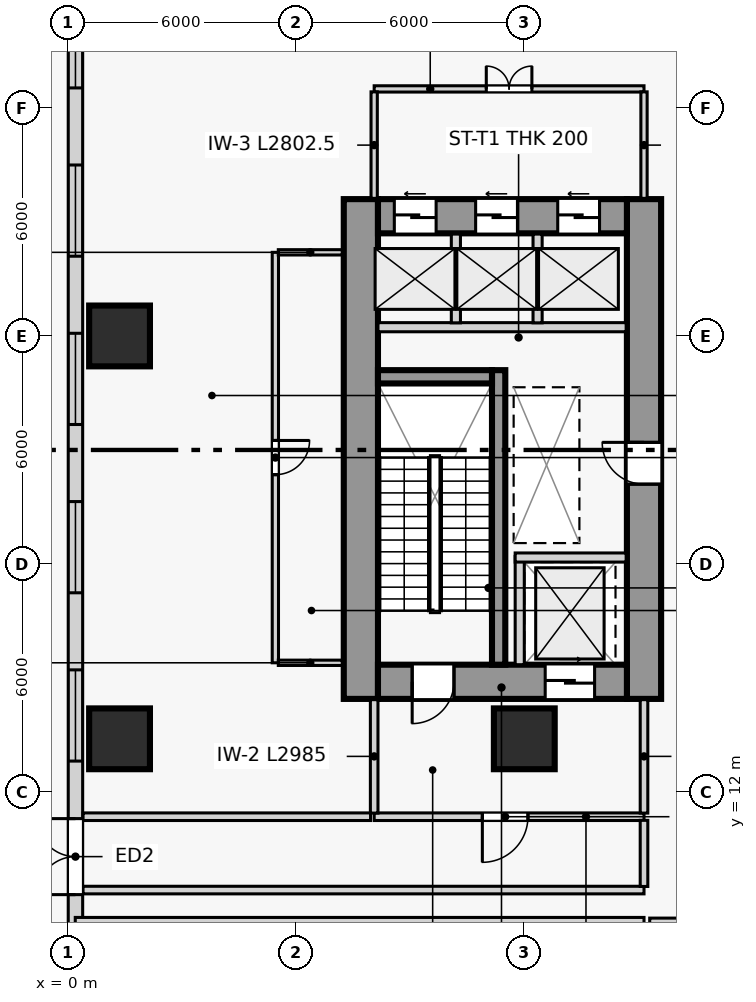
"""IFC4 building model, lengths in metres.
Left out: names, types, materials, properties, quantities, classifications, styles, units other than length and angle.
Written with IfcOpenShell. Run it as: python <this file> out.ifc"""

import sys

from ifc_helpers import new_model, si_unit, direction, frame, frame_2d, origin, origin_2d, place, context, subcontext, project, spatial, rectangle, extrude, source, transform, mapped, element, fill, save


model = new_model("IFC4")
c1 = context("Model", 3, precision=1e-05, world=origin(), true_north=direction((0.0, 1.0)))
c2 = subcontext(c1, "Body", "Model", "MODEL_VIEW")
j1 = project(units=[si_unit("LENGTHUNIT", "METRE"), si_unit("PLANEANGLEUNIT", "RADIAN")], contexts=[c1])
p1 = place(None, origin())
s1 = spatial("IfcSite", under=j1, at=p1, CompositionType="ELEMENT")
p2 = place(p1, origin())
s2 = spatial("IfcBuilding", under=s1, at=p2, CompositionType="ELEMENT")
p3 = place(p2, origin())
s3 = spatial("IfcBuildingStorey", under=s2, at=p3, CompositionType="ELEMENT", Elevation=0.0)
p4 = place(p3, frame((7.7, 14.45, 0.0), z_axis=(0.0, 0.0, 1.0), x_axis=(0.0, 1.0, 0.0)))
e1 = element("IfcWall", 1, at=p4, inside=s3, PredefinedType="SHEAR", context=c2, shape_type="SweptSolid", body=[
    extrude(rectangle(XDim=13.15, YDim=0.9, at=frame_2d((6.575, 0.0))), origin(), (0.0, 0.0, 1.0), 4.5),
])
p5 = place(p3, frame((15.15, 14.45, 0.0), z_axis=(0.0, 0.0, 1.0), x_axis=(0.0, 1.0, 0.0)))
e2 = element("IfcWall", 2, at=p5, inside=s3, PredefinedType="SHEAR", context=c2, shape_type="SweptSolid", body=[
    extrude(rectangle(XDim=13.15, YDim=0.9, at=frame_2d((6.575, 0.0))), origin(), (0.0, 0.0, 1.0), 4.5),
])
p6 = place(p5, frame((5.65, 0.0, 0.0)))
e3 = element("IfcOpeningElement", 3, at=p6, cuts=e2, PredefinedType="OPENING", context=c2, shape_type="SweptSolid", body=[
    extrude(rectangle(XDim=1.1, YDim=2.2, at=frame_2d((0.55, 1.1))), frame((0.0, 0.46, 0.0), z_axis=(0.0, -1.0, 0.0), x_axis=(1.0, 0.0, 0.0)), (0.0, 0.0, 1.0), 0.92),
])
p7 = place(p3, frame((8.15, 14.9, 0.0), z_axis=(0.0, 0.0, 1.0), x_axis=(1.0, 0.0, 0.0)))
e4 = element("IfcWall", 4, at=p7, inside=s3, PredefinedType="SHEAR", context=c2, shape_type="SweptSolid", body=[
    extrude(rectangle(XDim=6.55, YDim=0.9, at=frame_2d((3.275, 0.0))), origin(), (0.0, 0.0, 1.0), 4.5),
])
p8 = place(p7, frame((0.9, 0.0, 0.0)))
e5 = element("IfcOpeningElement", 5, at=p8, cuts=e4, PredefinedType="OPENING", context=c2, shape_type="SweptSolid", body=[
    extrude(rectangle(XDim=1.1, YDim=2.2, at=frame_2d((0.55, 1.1))), frame((0.0, 0.46, 0.0), z_axis=(0.0, -1.0, 0.0), x_axis=(1.0, 0.0, 0.0)), (0.0, 0.0, 1.0), 0.92),
])
p9 = place(p7, frame((4.4, 0.0, 0.0)))
e6 = element("IfcOpeningElement", 6, at=p9, cuts=e4, PredefinedType="OPENING", context=c2, shape_type="SweptSolid", body=[
    extrude(rectangle(XDim=1.3, YDim=2.2, at=frame_2d((0.65, 1.1))), frame((0.0, 0.46, 0.0), z_axis=(0.0, -1.0, 0.0), x_axis=(1.0, 0.0, 0.0)), (0.0, 0.0, 1.0), 0.92),
])
p10 = place(p3, frame((8.15, 27.15, 0.0), z_axis=(0.0, 0.0, 1.0), x_axis=(1.0, 0.0, 0.0)))
e7 = element("IfcWall", 7, at=p10, inside=s3, PredefinedType="SHEAR", context=c2, shape_type="SweptSolid", body=[
    extrude(rectangle(XDim=6.55, YDim=0.9, at=frame_2d((3.275, 0.0))), origin(), (0.0, 0.0, 1.0), 4.5),
])
p11 = place(p10, frame((0.43, 0.0, 0.0)))
e8 = element("IfcOpeningElement", 8, at=p11, cuts=e7, PredefinedType="OPENING", context=c2, shape_type="SweptSolid", body=[
    extrude(rectangle(XDim=1.1, YDim=2.2, at=frame_2d((0.55, 1.1))), frame((0.0, 0.46, 0.0), z_axis=(0.0, -1.0, 0.0), x_axis=(1.0, 0.0, 0.0)), (0.0, 0.0, 1.0), 0.92),
])
p12 = place(p10, frame((2.57, 0.0, 0.0)))
e9 = element("IfcOpeningElement", 9, at=p12, cuts=e7, PredefinedType="OPENING", context=c2, shape_type="SweptSolid", body=[
    extrude(rectangle(XDim=1.1, YDim=2.2, at=frame_2d((0.55, 1.1))), frame((0.0, 0.46, 0.0), z_axis=(0.0, -1.0, 0.0), x_axis=(1.0, 0.0, 0.0)), (0.0, 0.0, 1.0), 0.92),
])
p13 = place(p10, frame((4.73, 0.0, 0.0)))
e10 = element("IfcOpeningElement", 10, at=p13, cuts=e7, PredefinedType="OPENING", context=c2, shape_type="SweptSolid", body=[
    extrude(rectangle(XDim=1.1, YDim=2.2, at=frame_2d((0.55, 1.1))), frame((0.0, 0.46, 0.0), z_axis=(0.0, -1.0, 0.0), x_axis=(1.0, 0.0, 0.0)), (0.0, 0.0, 1.0), 0.92),
])
p14 = place(p3, frame((11.325, 15.35, 0.0), z_axis=(0.0, 0.0, 1.0), x_axis=(0.0, 1.0, 0.0)))
e11 = element("IfcWall", 11, at=p14, inside=s3, PredefinedType="SHEAR", context=c2, shape_type="SweptSolid", body=[
    extrude(rectangle(XDim=7.75, YDim=0.35, at=frame_2d((3.875, 0.0))), origin(), (0.0, 0.0, 1.0), 4.5),
])
p15 = place(p3, frame((8.15, 22.925, 0.0), z_axis=(0.0, 0.0, 1.0), x_axis=(1.0, 0.0, 0.0)))
e12 = element("IfcWall", 12, at=p15, inside=s3, PredefinedType="SHEAR", context=c2, shape_type="SweptSolid", body=[
    extrude(rectangle(XDim=3.0, YDim=0.35, at=frame_2d((1.5, 0.0))), origin(), (0.0, 0.0, 1.0), 4.5),
])
m1 = source(origin(), c2, "Body", "SweptSolid", [
    extrude(rectangle(XDim=1.6, YDim=1.6, at=origin_2d()), origin(), (0.0, 0.0, 1.0), 4.5),
])
for number, where, z_axis, x_axis in (
    (13, (1.35, 13.4, 0.0), (0.0, 0.0, 1.0), (1.0, 0.0, 0.0)),
    (14, (1.35, 24.0, 0.0), (0.0, 0.0, 1.0), (1.0, 0.0, 0.0)),
    (15, (12.0, 13.4, 0.0), (0.0, 0.0, 1.0), (1.0, 0.0, 0.0)),
):
    element("IfcColumn", number, at=place(p3, frame(where, z_axis=z_axis, x_axis=x_axis)), inside=s3, PredefinedType="COLUMN", context=c2, shape_type="MappedRepresentation", body=[
        mapped(m1, transform((0.0, 0.0, 0.0), scale=1.0)),
    ])
p16 = place(p3, frame((0.19, 47.81, 0.0), z_axis=(0.0, 0.0, 1.0), x_axis=(0.0, -1.0, 0.0)))
e16 = element("IfcWall", 16, at=p16, inside=s3, PredefinedType="SOLIDWALL", context=c2, shape_type="SweptSolid", body=[
    extrude(rectangle(XDim=53.62, YDim=0.38, at=frame_2d((26.81, 0.0))), origin(), (0.0, 0.0, 1.0), 4.16),
])
p17 = place(p16, frame((1.325, 0.0, 0.8)))
e17 = element("IfcOpeningElement", 17, at=p17, cuts=e16, PredefinedType="OPENING", context=c2, shape_type="SweptSolid", body=[
    extrude(rectangle(XDim=2.4, YDim=2.1, at=frame_2d((1.2, 1.05))), frame((0.0, 0.2, 0.0), z_axis=(0.0, -1.0, 0.0), x_axis=(1.0, 0.0, 0.0)), (0.0, 0.0, 1.0), 0.4),
])
p18 = place(p16, frame((5.655, 0.0, 0.8)))
e18 = element("IfcOpeningElement", 18, at=p18, cuts=e16, PredefinedType="OPENING", context=c2, shape_type="SweptSolid", body=[
    extrude(rectangle(XDim=2.4, YDim=2.1, at=frame_2d((1.2, 1.05))), frame((0.0, 0.2, 0.0), z_axis=(0.0, -1.0, 0.0), x_axis=(1.0, 0.0, 0.0)), (0.0, 0.0, 1.0), 0.4),
])
p19 = place(p16, frame((9.985, 0.0, 0.8)))
e19 = element("IfcOpeningElement", 19, at=p19, cuts=e16, PredefinedType="OPENING", context=c2, shape_type="SweptSolid", body=[
    extrude(rectangle(XDim=2.4, YDim=2.1, at=frame_2d((1.2, 1.05))), frame((0.0, 0.2, 0.0), z_axis=(0.0, -1.0, 0.0), x_axis=(1.0, 0.0, 0.0)), (0.0, 0.0, 1.0), 0.4),
])
p20 = place(p16, frame((14.884, 0.0, 0.8)))
e20 = element("IfcOpeningElement", 20, at=p20, cuts=e16, PredefinedType="OPENING", context=c2, shape_type="SweptSolid", body=[
    extrude(rectangle(XDim=2.4, YDim=2.1, at=frame_2d((1.2, 1.05))), frame((0.0, 0.2, 0.0), z_axis=(0.0, -1.0, 0.0), x_axis=(1.0, 0.0, 0.0)), (0.0, 0.0, 1.0), 0.4),
])
p21 = place(p16, frame((19.312, 0.0, 0.8)))
e21 = element("IfcOpeningElement", 21, at=p21, cuts=e16, PredefinedType="OPENING", context=c2, shape_type="SweptSolid", body=[
    extrude(rectangle(XDim=2.4, YDim=2.1, at=frame_2d((1.2, 1.05))), frame((0.0, 0.2, 0.0), z_axis=(0.0, -1.0, 0.0), x_axis=(1.0, 0.0, 0.0)), (0.0, 0.0, 1.0), 0.4),
])
p22 = place(p16, frame((23.74, 0.0, 0.8)))
e22 = element("IfcOpeningElement", 22, at=p22, cuts=e16, PredefinedType="OPENING", context=c2, shape_type="SweptSolid", body=[
    extrude(rectangle(XDim=2.4, YDim=2.1, at=frame_2d((1.2, 1.05))), frame((0.0, 0.2, 0.0), z_axis=(0.0, -1.0, 0.0), x_axis=(1.0, 0.0, 0.0)), (0.0, 0.0, 1.0), 0.4),
])
p23 = place(p16, frame((28.168, 0.0, 0.8)))
e23 = element("IfcOpeningElement", 23, at=p23, cuts=e16, PredefinedType="OPENING", context=c2, shape_type="SweptSolid", body=[
    extrude(rectangle(XDim=2.4, YDim=2.1, at=frame_2d((1.2, 1.05))), frame((0.0, 0.2, 0.0), z_axis=(0.0, -1.0, 0.0), x_axis=(1.0, 0.0, 0.0)), (0.0, 0.0, 1.0), 0.4),
])
p24 = place(p16, frame((32.596, 0.0, 0.8)))
e24 = element("IfcOpeningElement", 24, at=p24, cuts=e16, PredefinedType="OPENING", context=c2, shape_type="SweptSolid", body=[
    extrude(rectangle(XDim=2.4, YDim=2.1, at=frame_2d((1.2, 1.05))), frame((0.0, 0.2, 0.0), z_axis=(0.0, -1.0, 0.0), x_axis=(1.0, 0.0, 0.0)), (0.0, 0.0, 1.0), 0.4),
])
p25 = place(p16, frame((40.568, 0.0, 0.8)))
e25 = element("IfcOpeningElement", 25, at=p25, cuts=e16, PredefinedType="OPENING", context=c2, shape_type="SweptSolid", body=[
    extrude(rectangle(XDim=2.4, YDim=2.1, at=frame_2d((1.2, 1.05))), frame((0.0, 0.2, 0.0), z_axis=(0.0, -1.0, 0.0), x_axis=(1.0, 0.0, 0.0)), (0.0, 0.0, 1.0), 0.4),
])
p26 = place(p16, frame((45.165, 0.0, 0.8)))
e26 = element("IfcOpeningElement", 26, at=p26, cuts=e16, PredefinedType="OPENING", context=c2, shape_type="SweptSolid", body=[
    extrude(rectangle(XDim=2.4, YDim=2.1, at=frame_2d((1.2, 1.05))), frame((0.0, 0.2, 0.0), z_axis=(0.0, -1.0, 0.0), x_axis=(1.0, 0.0, 0.0)), (0.0, 0.0, 1.0), 0.4),
])
p27 = place(p16, frame((49.762, 0.0, 0.8)))
e27 = element("IfcOpeningElement", 27, at=p27, cuts=e16, PredefinedType="OPENING", context=c2, shape_type="SweptSolid", body=[
    extrude(rectangle(XDim=2.4, YDim=2.1, at=frame_2d((1.2, 1.05))), frame((0.0, 0.2, 0.0), z_axis=(0.0, -1.0, 0.0), x_axis=(1.0, 0.0, 0.0)), (0.0, 0.0, 1.0), 0.4),
])
p28 = place(p16, frame((36.51, 0.0, 0.0)))
e28 = element("IfcOpeningElement", 28, at=p28, cuts=e16, PredefinedType="OPENING", context=c2, shape_type="SweptSolid", body=[
    extrude(rectangle(XDim=2.0, YDim=2.4, at=frame_2d((1.0, 1.2))), frame((0.0, 0.2, 0.0), z_axis=(0.0, -1.0, 0.0), x_axis=(1.0, 0.0, 0.0)), (0.0, 0.0, 1.0), 0.4),
])
p29 = place(p3, frame((11.88, 15.35, 0.0), z_axis=(0.0, 0.0, 1.0), x_axis=(0.0, 1.0, 0.0)))
e29 = element("IfcWall", 29, at=p29, inside=s3, PredefinedType="PARTITIONING", context=c2, shape_type="SweptSolid", body=[
    extrude(rectangle(XDim=2.85, YDim=0.24, at=frame_2d((1.425, 0.0))), origin(), (0.0, 0.0, 1.0), 4.16),
])
p30 = place(p3, frame((11.76, 18.17, 0.0), z_axis=(0.0, 0.0, 1.0), x_axis=(1.0, 0.0, 0.0)))
e30 = element("IfcWall", 30, at=p30, inside=s3, PredefinedType="PARTITIONING", context=c2, shape_type="SweptSolid", body=[
    extrude(rectangle(XDim=2.92, YDim=0.24, at=frame_2d((1.46, 0.0))), origin(), (0.0, 0.0, 1.0), 4.16),
])
p31 = place(p3, frame((8.05, 11.35, 0.0), z_axis=(0.0, 0.0, 1.0), x_axis=(1.0, 0.0, 0.0)))
e31 = element("IfcWall", 31, at=p31, inside=s3, PredefinedType="PARTITIONING", context=c2, shape_type="SweptSolid", body=[
    extrude(rectangle(XDim=7.1, YDim=0.2, at=frame_2d((3.55, 0.0))), origin(), (0.0, 0.0, 1.0), 4.16),
])
p32 = place(p31, frame((2.846, 0.0, 0.0)))
e32 = element("IfcOpeningElement", 32, at=p32, cuts=e31, PredefinedType="OPENING", context=c2, shape_type="SweptSolid", body=[
    extrude(rectangle(XDim=1.2, YDim=2.2, at=frame_2d((0.6, 1.1))), frame((0.0, 0.11, 0.0), z_axis=(0.0, -1.0, 0.0), x_axis=(1.0, 0.0, 0.0)), (0.0, 0.0, 1.0), 0.22),
])
for number, where, z_axis, x_axis in (
    (33, (8.05, 11.445, 0.0), (0.0, 0.0, 1.0), (0.0, 1.0, 0.0)),
    (34, (15.15, 11.445, 0.0), (0.0, 0.0, 1.0), (0.0, 1.0, 0.0)),
):
    element("IfcWall", number, at=place(p3, frame(where, z_axis=z_axis, x_axis=x_axis)), inside=s3, PredefinedType="PARTITIONING", context=c2, shape_type="SweptSolid", body=[
        extrude(rectangle(XDim=2.985, YDim=0.2, at=frame_2d((1.492, 0.0))), origin(), (0.0, 0.0, 1.0), 4.16),
    ])
p33 = place(p3, frame((8.15, 24.23, 0.0), z_axis=(0.0, 0.0, 1.0), x_axis=(1.0, 0.0, 0.0)))
e35 = element("IfcWall", 35, at=p33, inside=s3, PredefinedType="PARTITIONING", context=c2, shape_type="SweptSolid", body=[
    extrude(rectangle(XDim=6.53, YDim=0.24, at=frame_2d((3.265, 0.0))), origin(), (0.0, 0.0, 1.0), 4.16),
])
for number, where, z_axis, x_axis in (
    (36, (10.2, 24.345, 0.0), (0.0, 0.0, 1.0), (0.0, 1.0, 0.0)),
    (37, (12.35, 24.345, 0.0), (0.0, 0.0, 1.0), (0.0, 1.0, 0.0)),
):
    element("IfcWall", number, at=place(p3, frame(where, z_axis=z_axis, x_axis=x_axis)), inside=s3, PredefinedType="PARTITIONING", context=c2, shape_type="SweptSolid", body=[
        extrude(rectangle(XDim=2.335, YDim=0.24, at=frame_2d((1.167, 0.0))), origin(), (0.0, 0.0, 1.0), 4.16),
    ])
p34 = place(p3, frame((8.05, 30.5, 0.0), z_axis=(0.0, 0.0, 1.0), x_axis=(1.0, 0.0, 0.0)))
e38 = element("IfcWall", 38, at=p34, inside=s3, PredefinedType="PARTITIONING", context=c2, shape_type="SweptSolid", body=[
    extrude(rectangle(XDim=7.1, YDim=0.165, at=frame_2d((3.55, 0.0))), origin(), (0.0, 0.0, 1.0), 4.16),
])
p35 = place(p34, frame((2.95, 0.0, 0.0)))
e39 = element("IfcOpeningElement", 39, at=p35, cuts=e38, PredefinedType="OPENING", context=c2, shape_type="SweptSolid", body=[
    extrude(rectangle(XDim=1.2, YDim=2.2, at=frame_2d((0.6, 1.1))), frame((0.0, 0.093, 0.0), z_axis=(0.0, -1.0, 0.0), x_axis=(1.0, 0.0, 0.0)), (0.0, 0.0, 1.0), 0.185),
])
for number, where, z_axis, x_axis in (
    (40, (8.05, 27.62, 0.0), (0.0, 0.0, 1.0), (0.0, 1.0, 0.0)),
    (41, (15.15, 27.62, 0.0), (0.0, 0.0, 1.0), (0.0, 1.0, 0.0)),
):
    element("IfcWall", number, at=place(p3, frame(where, z_axis=z_axis, x_axis=x_axis)), inside=s3, PredefinedType="PARTITIONING", context=c2, shape_type="SweptSolid", body=[
        extrude(rectangle(XDim=2.802, YDim=0.165, at=frame_2d((1.401, 0.0))), origin(), (0.0, 0.0, 1.0), 4.16),
    ])
p36 = place(p3, frame((5.45, 15.4, 0.0), z_axis=(0.0, 0.0, 1.0), x_axis=(0.0, 1.0, 0.0)))
e42 = element("IfcWall", 42, at=p36, inside=s3, PredefinedType="PARTITIONING", context=c2, shape_type="SweptSolid", body=[
    extrude(rectangle(XDim=10.8, YDim=0.165, at=frame_2d((5.4, 0.0))), origin(), (0.0, 0.0, 1.0), 4.16),
])
p37 = place(p36, frame((4.95, 0.0, 0.0)))
e43 = element("IfcOpeningElement", 43, at=p37, cuts=e42, PredefinedType="OPENING", context=c2, shape_type="SweptSolid", body=[
    extrude(rectangle(XDim=0.9, YDim=2.1, at=frame_2d((0.45, 1.05))), frame((0.0, 0.093, 0.0), z_axis=(0.0, -1.0, 0.0), x_axis=(1.0, 0.0, 0.0)), (0.0, 0.0, 1.0), 0.185),
])
for number, where, z_axis, x_axis in (
    (44, (5.528, 15.4, 0.0), (0.0, 0.0, 1.0), (1.0, 0.0, 0.0)),
    (45, (5.528, 26.2, 0.0), (0.0, 0.0, 1.0), (1.0, 0.0, 0.0)),
):
    element("IfcWall", number, at=place(p3, frame(where, z_axis=z_axis, x_axis=x_axis)), inside=s3, PredefinedType="PARTITIONING", context=c2, shape_type="SweptSolid", body=[
        extrude(rectangle(XDim=1.682, YDim=0.14, at=frame_2d((0.841, 0.0))), origin(), (0.0, 0.0, 1.0), 4.16),
    ])
p38 = place(p3, frame((15.3, 8.6, 0.0), z_axis=(0.0, 0.0, 1.0), x_axis=(1.0, 0.0, 0.0)))
e46 = element("IfcWall", 46, at=p38, inside=s3, PredefinedType="PARTITIONING", context=c2, shape_type="SweptSolid", body=[
    extrude(rectangle(XDim=10.15, YDim=0.165, at=frame_2d((5.075, 0.0))), origin(), (0.0, 0.0, 1.0), 4.16),
])
p39 = place(p38, frame((4.475, 0.0, 0.0)))
e47 = element("IfcOpeningElement", 47, at=p39, cuts=e46, PredefinedType="OPENING", context=c2, shape_type="SweptSolid", body=[
    extrude(rectangle(XDim=1.2, YDim=2.2, at=frame_2d((0.6, 1.1))), frame((0.0, 0.093, 0.0), z_axis=(0.0, -1.0, 0.0), x_axis=(1.0, 0.0, 0.0)), (0.0, 0.0, 1.0), 0.185),
])
p40 = place(p3, frame((0.39, 9.42, 0.0), z_axis=(0.0, 0.0, 1.0), x_axis=(1.0, 0.0, 0.0)))
e48 = element("IfcWall", 48, at=p40, inside=s3, PredefinedType="PARTITIONING", context=c2, shape_type="SweptSolid", body=[
    extrude(rectangle(XDim=14.76, YDim=0.2, at=frame_2d((7.38, 0.0))), origin(), (0.0, 0.0, 1.0), 4.16),
])
p41 = place(p3, frame((0.39, 11.35, 0.0), z_axis=(0.0, 0.0, 1.0), x_axis=(1.0, 0.0, 0.0)))
e49 = element("IfcWall", 49, at=p41, inside=s3, PredefinedType="PARTITIONING", context=c2, shape_type="SweptSolid", body=[
    extrude(rectangle(XDim=7.565, YDim=0.2, at=frame_2d((3.783, 0.0))), origin(), (0.0, 0.0, 1.0), 4.16),
])
p42 = place(p3, frame((15.15, 9.515, 0.0), z_axis=(0.0, 0.0, 1.0), x_axis=(0.0, 1.0, 0.0)))
e50 = element("IfcWall", 50, at=p42, inside=s3, PredefinedType="PARTITIONING", context=c2, shape_type="SweptSolid", body=[
    extrude(rectangle(XDim=1.74, YDim=0.2, at=frame_2d((0.87, 0.0))), origin(), (0.0, 0.0, 1.0), 4.16),
])
p43 = place(p3, frame((0.185, 8.6, 0.0), z_axis=(0.0, 0.0, 1.0), x_axis=(1.0, 0.0, 0.0)))
e51 = element("IfcWall", 51, at=p43, inside=s3, PredefinedType="PARTITIONING", context=c2, shape_type="SweptSolid", body=[
    extrude(rectangle(XDim=14.965, YDim=0.2, at=frame_2d((7.482, 0.0))), origin(), (0.0, 0.0, 1.0), 4.16),
])
m2 = source(origin(), c2, "Body", "SweptSolid", [
    extrude(rectangle(XDim=2.4, YDim=2.1, at=frame_2d((1.2, 1.05))), frame((0.0, 0.03, 0.0), z_axis=(0.0, -1.0, 0.0), x_axis=(1.0, 0.0, 0.0)), (0.0, 0.0, 1.0), 0.06),
])
p44 = place(p20, origin())
e52 = element("IfcWindow", 52, at=p44, inside=s3, PartitioningType="SINGLE_PANEL", PredefinedType="WINDOW", context=c2, shape_type="MappedRepresentation", body=[
    mapped(m2, transform((0.0, 0.0, 0.0), scale=1.0)),
])
fill(e20, e52)
p45 = place(p21, origin())
e53 = element("IfcWindow", 53, at=p45, inside=s3, PartitioningType="SINGLE_PANEL", PredefinedType="WINDOW", context=c2, shape_type="MappedRepresentation", body=[
    mapped(m2, transform((0.0, 0.0, 0.0), scale=1.0)),
])
fill(e21, e53)
p46 = place(p22, origin())
e54 = element("IfcWindow", 54, at=p46, inside=s3, PartitioningType="SINGLE_PANEL", PredefinedType="WINDOW", context=c2, shape_type="MappedRepresentation", body=[
    mapped(m2, transform((0.0, 0.0, 0.0), scale=1.0)),
])
fill(e22, e54)
p47 = place(p23, origin())
e55 = element("IfcWindow", 55, at=p47, inside=s3, PartitioningType="SINGLE_PANEL", PredefinedType="WINDOW", context=c2, shape_type="MappedRepresentation", body=[
    mapped(m2, transform((0.0, 0.0, 0.0), scale=1.0)),
])
fill(e23, e55)
p48 = place(p24, origin())
e56 = element("IfcWindow", 56, at=p48, inside=s3, PartitioningType="SINGLE_PANEL", PredefinedType="WINDOW", context=c2, shape_type="MappedRepresentation", body=[
    mapped(m2, transform((0.0, 0.0, 0.0), scale=1.0)),
])
fill(e24, e56)
m3 = source(origin(), c2, "Body", "SweptSolid", [
    extrude(rectangle(XDim=2.0, YDim=2.4, at=frame_2d((1.0, 1.2))), frame((0.0, 0.025, 0.0), z_axis=(0.0, -1.0, 0.0), x_axis=(1.0, 0.0, 0.0)), (0.0, 0.0, 1.0), 0.05),
])
p49 = place(p28, frame((2.0, 0.0, 0.0), z_axis=(0.0, 0.0, 1.0), x_axis=(-1.0, 0.0, 0.0)))
e57 = element("IfcDoor", 57, at=p49, inside=s3, OperationType="DOUBLE_DOOR_SINGLE_SWING", PredefinedType="DOOR", context=c2, shape_type="MappedRepresentation", body=[
    mapped(m3, transform((0.0, 0.0, 0.0), scale=1.0)),
])
fill(e28, e57)
m4 = source(origin(), c2, "Body", "SweptSolid", [
    extrude(rectangle(XDim=1.1, YDim=2.2, at=frame_2d((0.55, 1.1))), frame((0.0, 0.025, 0.0), z_axis=(0.0, -1.0, 0.0), x_axis=(1.0, 0.0, 0.0)), (0.0, 0.0, 1.0), 0.05),
])
p50 = place(p8, frame((1.1, 0.0, 0.0), z_axis=(0.0, 0.0, 1.0), x_axis=(-1.0, 0.0, 0.0)))
e58 = element("IfcDoor", 58, at=p50, inside=s3, OperationType="SINGLE_SWING_RIGHT", PredefinedType="DOOR", context=c2, shape_type="MappedRepresentation", body=[
    mapped(m4, transform((0.0, 0.0, 0.0), scale=1.0)),
])
fill(e5, e58)
m5 = source(origin(), c2, "Body", "SweptSolid", [
    extrude(rectangle(XDim=1.3, YDim=2.2, at=frame_2d((0.65, 1.1))), frame((0.0, 0.025, 0.0), z_axis=(0.0, -1.0, 0.0), x_axis=(1.0, 0.0, 0.0)), (0.0, 0.0, 1.0), 0.05),
])
p51 = place(p9, origin())
e59 = element("IfcDoor", 59, at=p51, inside=s3, OperationType="SLIDING_TO_RIGHT", PredefinedType="DOOR", context=c2, shape_type="MappedRepresentation", body=[
    mapped(m5, transform((0.0, 0.0, 0.0), scale=1.0)),
])
fill(e6, e59)
m6 = source(origin(), c2, "Body", "SweptSolid", [
    extrude(rectangle(XDim=1.2, YDim=2.2, at=frame_2d((0.6, 1.1))), frame((0.0, 0.025, 0.0), z_axis=(0.0, -1.0, 0.0), x_axis=(1.0, 0.0, 0.0)), (0.0, 0.0, 1.0), 0.05),
])
p52 = place(p32, frame((1.2, 0.0, 0.0), z_axis=(0.0, 0.0, 1.0), x_axis=(-1.0, 0.0, 0.0)))
e60 = element("IfcDoor", 60, at=p52, inside=s3, OperationType="SINGLE_SWING_RIGHT", PredefinedType="DOOR", context=c2, shape_type="MappedRepresentation", body=[
    mapped(m6, transform((0.0, 0.0, 0.0), scale=1.0)),
])
fill(e32, e60)
m7 = source(origin(), c2, "Body", "SweptSolid", [
    extrude(rectangle(XDim=1.1, YDim=2.2, at=frame_2d((0.55, 1.1))), frame((0.0, 0.025, 0.0), z_axis=(0.0, -1.0, 0.0), x_axis=(1.0, 0.0, 0.0)), (0.0, 0.0, 1.0), 0.05),
])
p53 = place(p11, origin())
e61 = element("IfcDoor", 61, at=p53, inside=s3, OperationType="SLIDING_TO_LEFT", PredefinedType="DOOR", context=c2, shape_type="MappedRepresentation", body=[
    mapped(m7, transform((0.0, 0.0, 0.0), scale=1.0)),
])
fill(e8, e61)
p54 = place(p12, origin())
e62 = element("IfcDoor", 62, at=p54, inside=s3, OperationType="SLIDING_TO_LEFT", PredefinedType="DOOR", context=c2, shape_type="MappedRepresentation", body=[
    mapped(m7, transform((0.0, 0.0, 0.0), scale=1.0)),
])
fill(e9, e62)
p55 = place(p13, origin())
e63 = element("IfcDoor", 63, at=p55, inside=s3, OperationType="SLIDING_TO_LEFT", PredefinedType="DOOR", context=c2, shape_type="MappedRepresentation", body=[
    mapped(m7, transform((0.0, 0.0, 0.0), scale=1.0)),
])
fill(e10, e63)
p56 = place(p35, origin())
e64 = element("IfcDoor", 64, at=p56, inside=s3, OperationType="DOUBLE_DOOR_SINGLE_SWING", PredefinedType="DOOR", context=c2, shape_type="MappedRepresentation", body=[
    mapped(m6, transform((0.0, 0.0, 0.0), scale=1.0)),
])
fill(e39, e64)
p57 = place(p6, origin())
e65 = element("IfcDoor", 65, at=p57, inside=s3, OperationType="SINGLE_SWING_RIGHT", PredefinedType="DOOR", context=c2, shape_type="MappedRepresentation", body=[
    mapped(m4, transform((0.0, 0.0, 0.0), scale=1.0)),
])
fill(e3, e65)
m8 = source(origin(), c2, "Body", "SweptSolid", [
    extrude(rectangle(XDim=0.9, YDim=2.1, at=frame_2d((0.45, 1.05))), frame((0.0, 0.025, 0.0), z_axis=(0.0, -1.0, 0.0), x_axis=(1.0, 0.0, 0.0)), (0.0, 0.0, 1.0), 0.05),
])
p58 = place(p37, frame((0.9, 0.0, 0.0), z_axis=(0.0, 0.0, 1.0), x_axis=(-1.0, 0.0, 0.0)))
e66 = element("IfcDoor", 66, at=p58, inside=s3, OperationType="SINGLE_SWING_LEFT", PredefinedType="DOOR", context=c2, shape_type="MappedRepresentation", body=[
    mapped(m8, transform((0.0, 0.0, 0.0), scale=1.0)),
])
fill(e43, e66)
save(model, sys.argv[1])
